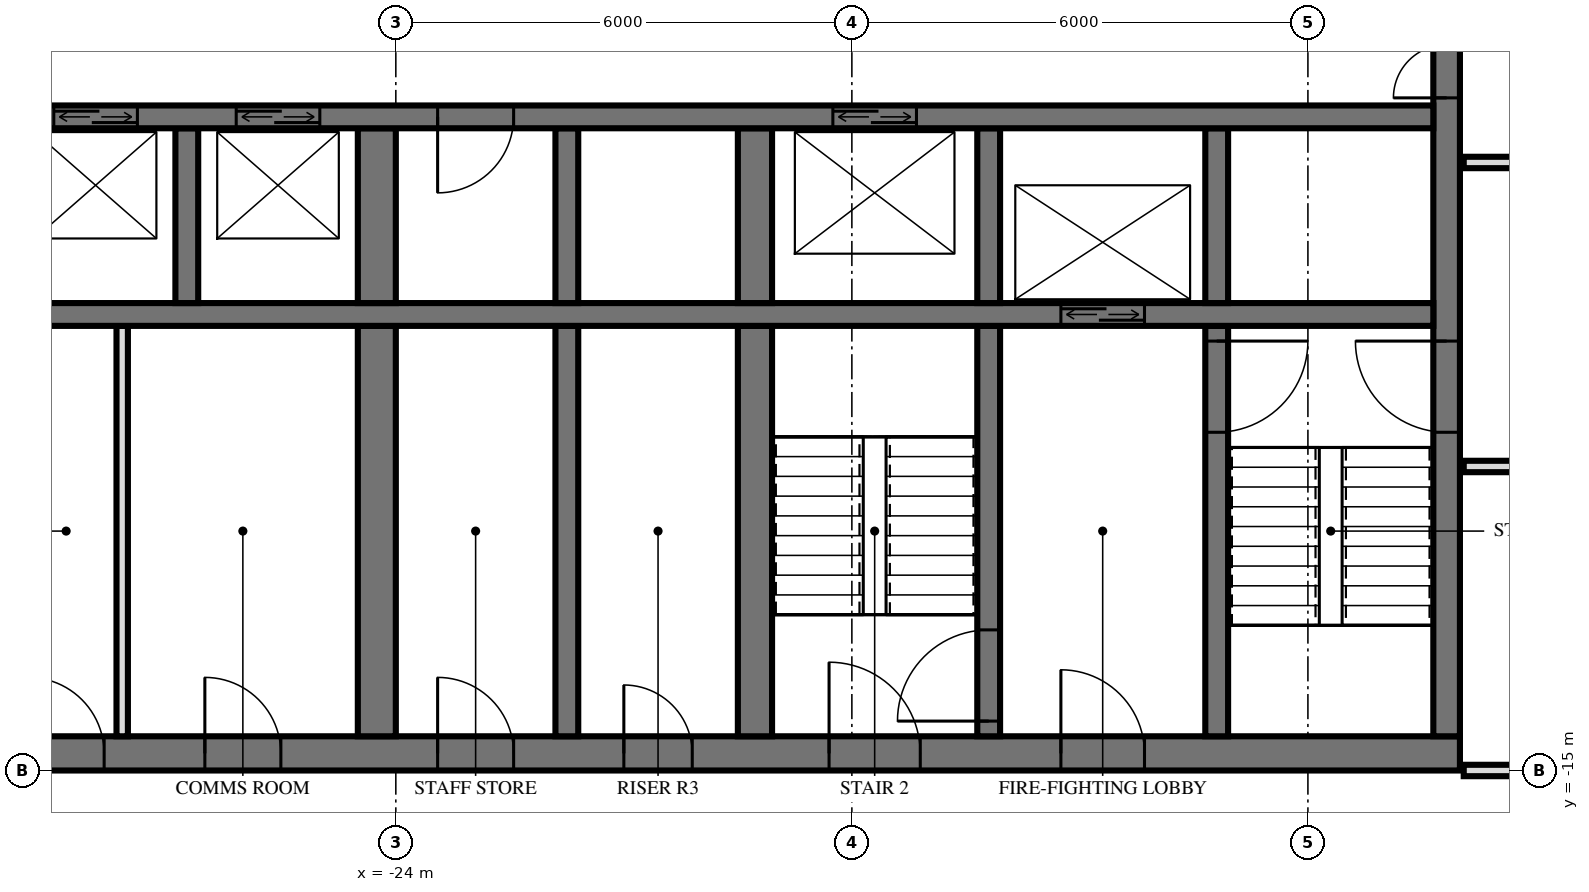
"""IFC4 building model, lengths in metres.
Left out: names, types, materials, properties, quantities, classifications, styles, units other than length and angle.
Written with IfcOpenShell. Run it as: python <this file> out.ifc"""

import sys

from ifc_helpers import new_model, si_unit, direction, frame, frame_2d, origin, place, context, subcontext, project, spatial, rectangle, extrude, element, fill, save


model = new_model("IFC4")
c1 = context("Model", 3, precision=1e-05, world=origin(), true_north=direction((0.0, 1.0)))
c2 = subcontext(c1, "Body", "Model", "MODEL_VIEW")
j1 = project(units=[si_unit("LENGTHUNIT", "METRE"), si_unit("PLANEANGLEUNIT", "RADIAN")], contexts=[c1])
p1 = place(None, origin())
s1 = spatial("IfcSite", under=j1, at=p1, CompositionType="ELEMENT")
p2 = place(p1, origin())
s2 = spatial("IfcBuilding", under=s1, at=p2, CompositionType="ELEMENT")
p3 = place(p2, frame((0.0, 0.0, 81.6)))
s3 = spatial("IfcBuildingStorey", under=s2, at=p3, CompositionType="ELEMENT", Elevation=81.6)
p4 = place(p3, frame((-29.5, -14.775, 0.0), z_axis=(0.0, 0.0, 1.0), x_axis=(1.0, 0.0, 0.0)))
e1 = element("IfcWall", 1, at=p4, inside=s3, PredefinedType="SHEAR", context=c2, shape_type="SweptSolid", body=[
    extrude(rectangle(XDim=19.5, YDim=0.45, at=frame_2d((9.75, 0.0))), origin(), (0.0, 0.0, 1.0), 3.6),
])
p5 = place(p4, frame((11.2, 0.0, 0.0)))
e2 = element("IfcOpeningElement", 2, at=p5, cuts=e1, PredefinedType="OPENING", context=c2, shape_type="SweptSolid", body=[
    extrude(rectangle(XDim=1.2, YDim=2.1, at=frame_2d((0.6, 1.05))), frame((0.0, 0.235, 0.0), z_axis=(0.0, -1.0, 0.0), x_axis=(1.0, 0.0, 0.0)), (0.0, 0.0, 1.0), 0.47),
])
p6 = place(p4, frame((14.25, 0.0, 0.0)))
e3 = element("IfcOpeningElement", 3, at=p6, cuts=e1, PredefinedType="OPENING", context=c2, shape_type="SweptSolid", body=[
    extrude(rectangle(XDim=1.1, YDim=2.1, at=frame_2d((0.55, 1.05))), frame((0.0, 0.235, 0.0), z_axis=(0.0, -1.0, 0.0), x_axis=(1.0, 0.0, 0.0)), (0.0, 0.0, 1.0), 0.47),
])
p7 = place(p4, frame((8.5, 0.0, 0.0)))
e4 = element("IfcOpeningElement", 4, at=p7, cuts=e1, PredefinedType="OPENING", context=c2, shape_type="SweptSolid", body=[
    extrude(rectangle(XDim=0.9, YDim=2.1, at=frame_2d((0.45, 1.05))), frame((0.0, 0.235, 0.0), z_axis=(0.0, -1.0, 0.0), x_axis=(1.0, 0.0, 0.0)), (0.0, 0.0, 1.0), 0.47),
])
p8 = place(p4, frame((6.05, 0.0, 0.0)))
e5 = element("IfcOpeningElement", 5, at=p8, cuts=e1, PredefinedType="OPENING", context=c2, shape_type="SweptSolid", body=[
    extrude(rectangle(XDim=1.0, YDim=2.1, at=frame_2d((0.5, 1.05))), frame((0.0, 0.235, 0.0), z_axis=(0.0, -1.0, 0.0), x_axis=(1.0, 0.0, 0.0)), (0.0, 0.0, 1.0), 0.47),
])
p9 = place(p4, frame((2.988, 0.0, 0.0)))
e6 = element("IfcOpeningElement", 6, at=p9, cuts=e1, PredefinedType="OPENING", context=c2, shape_type="SweptSolid", body=[
    extrude(rectangle(XDim=1.0, YDim=2.1, at=frame_2d((0.5, 1.05))), frame((0.0, 0.235, 0.0), z_axis=(0.0, -1.0, 0.0), x_axis=(1.0, 0.0, 0.0)), (0.0, 0.0, 1.0), 0.47),
])
p10 = place(p4, frame((0.663, 0.0, 0.0)))
e7 = element("IfcOpeningElement", 7, at=p10, cuts=e1, PredefinedType="OPENING", context=c2, shape_type="SweptSolid", body=[
    extrude(rectangle(XDim=1.0, YDim=2.1, at=frame_2d((0.5, 1.05))), frame((0.0, 0.235, 0.0), z_axis=(0.0, -1.0, 0.0), x_axis=(1.0, 0.0, 0.0)), (0.0, 0.0, 1.0), 0.47),
])
p11 = place(p3, frame((-10.175, -14.55, 0.0), z_axis=(0.0, 0.0, 1.0), x_axis=(0.0, 1.0, 0.0)))
e8 = element("IfcWall", 8, at=p11, inside=s3, PredefinedType="SHEAR", context=c2, shape_type="SweptSolid", body=[
    extrude(rectangle(XDim=14.1, YDim=0.35, at=frame_2d((7.05, 0.0))), origin(), (0.0, 0.0, 1.0), 3.6),
])
p12 = place(p11, frame((8.4, 0.0, 0.0)))
e9 = element("IfcOpeningElement", 9, at=p12, cuts=e8, PredefinedType="OPENING", context=c2, shape_type="SweptSolid", body=[
    extrude(rectangle(XDim=1.4, YDim=2.4, at=frame_2d((0.7, 1.2))), frame((0.0, 0.185, 0.0), z_axis=(0.0, -1.0, 0.0), x_axis=(1.0, 0.0, 0.0)), (0.0, 0.0, 1.0), 0.37),
])
p13 = place(p11, frame((10.0, 0.0, 0.0)))
e10 = element("IfcOpeningElement", 10, at=p13, cuts=e8, PredefinedType="OPENING", context=c2, shape_type="SweptSolid", body=[
    extrude(rectangle(XDim=1.4, YDim=2.4, at=frame_2d((0.7, 1.2))), frame((0.0, 0.185, 0.0), z_axis=(0.0, -1.0, 0.0), x_axis=(1.0, 0.0, 0.0)), (0.0, 0.0, 1.0), 0.37),
])
p14 = place(p11, frame((4.0, 0.0, 0.0)))
e11 = element("IfcOpeningElement", 11, at=p14, cuts=e8, PredefinedType="OPENING", context=c2, shape_type="SweptSolid", body=[
    extrude(rectangle(XDim=1.2, YDim=2.1, at=frame_2d((0.6, 1.05))), frame((0.0, 0.185, 0.0), z_axis=(0.0, -1.0, 0.0), x_axis=(1.0, 0.0, 0.0)), (0.0, 0.0, 1.0), 0.37),
])
p15 = place(p3, frame((-29.05, -6.4, 0.0), z_axis=(0.0, 0.0, 1.0), x_axis=(1.0, 0.0, 0.0)))
e12 = element("IfcWall", 12, at=p15, inside=s3, PredefinedType="SHEAR", context=c2, shape_type="SweptSolid", body=[
    extrude(rectangle(XDim=18.7, YDim=0.3, at=frame_2d((9.35, 0.0))), origin(), (0.0, 0.0, 1.0), 3.6),
])
p16 = place(p15, frame((2.95, 0.0, 0.0)))
e13 = element("IfcOpeningElement", 13, at=p16, cuts=e12, PredefinedType="OPENING", context=c2, shape_type="SweptSolid", body=[
    extrude(rectangle(XDim=1.1, YDim=2.1, at=frame_2d((0.55, 1.05))), frame((0.0, 0.16, 0.0), z_axis=(0.0, -1.0, 0.0), x_axis=(1.0, 0.0, 0.0)), (0.0, 0.0, 1.0), 0.32),
])
p17 = place(p15, frame((0.55, 0.0, 0.0)))
e14 = element("IfcOpeningElement", 14, at=p17, cuts=e12, PredefinedType="OPENING", context=c2, shape_type="SweptSolid", body=[
    extrude(rectangle(XDim=1.1, YDim=2.1, at=frame_2d((0.55, 1.05))), frame((0.0, 0.16, 0.0), z_axis=(0.0, -1.0, 0.0), x_axis=(1.0, 0.0, 0.0)), (0.0, 0.0, 1.0), 0.32),
])
p18 = place(p15, frame((10.8, 0.0, 0.0)))
e15 = element("IfcOpeningElement", 15, at=p18, cuts=e12, PredefinedType="OPENING", context=c2, shape_type="SweptSolid", body=[
    extrude(rectangle(XDim=1.1, YDim=2.1, at=frame_2d((0.55, 1.05))), frame((0.0, 0.16, 0.0), z_axis=(0.0, -1.0, 0.0), x_axis=(1.0, 0.0, 0.0)), (0.0, 0.0, 1.0), 0.32),
])
p19 = place(p15, frame((5.6, 0.0, 0.0)))
e16 = element("IfcOpeningElement", 16, at=p19, cuts=e12, PredefinedType="OPENING", context=c2, shape_type="SweptSolid", body=[
    extrude(rectangle(XDim=1.0, YDim=2.1, at=frame_2d((0.5, 1.05))), frame((0.0, 0.16, 0.0), z_axis=(0.0, -1.0, 0.0), x_axis=(1.0, 0.0, 0.0)), (0.0, 0.0, 1.0), 0.32),
])
p20 = place(p3, frame((-29.05, -9.0, 0.0), z_axis=(0.0, 0.0, 1.0), x_axis=(1.0, 0.0, 0.0)))
e17 = element("IfcWall", 17, at=p20, inside=s3, PredefinedType="SHEAR", context=c2, shape_type="SweptSolid", body=[
    extrude(rectangle(XDim=18.7, YDim=0.3, at=frame_2d((9.35, 0.0))), origin(), (0.0, 0.0, 1.0), 3.6),
])
p21 = place(p20, frame((13.8, 0.0, 0.0)))
e18 = element("IfcOpeningElement", 18, at=p21, cuts=e17, PredefinedType="OPENING", context=c2, shape_type="SweptSolid", body=[
    extrude(rectangle(XDim=1.1, YDim=2.1, at=frame_2d((0.55, 1.05))), frame((0.0, 0.16, 0.0), z_axis=(0.0, -1.0, 0.0), x_axis=(1.0, 0.0, 0.0)), (0.0, 0.0, 1.0), 0.32),
])
p22 = place(p3, frame((-13.2, -8.85, 0.0), z_axis=(0.0, 0.0, 1.0), x_axis=(0.0, 1.0, 0.0)))
e19 = element("IfcWall", 19, at=p22, inside=s3, PredefinedType="SHEAR", context=c2, shape_type="SweptSolid", body=[
    extrude(rectangle(XDim=2.3, YDim=0.3, at=frame_2d((1.15, 0.0))), origin(), (0.0, 0.0, 1.0), 3.6),
])
p23 = place(p3, frame((-13.2, -14.55, 0.0), z_axis=(0.0, 0.0, 1.0), x_axis=(0.0, 1.0, 0.0)))
e20 = element("IfcWall", 20, at=p23, inside=s3, PredefinedType="SHEAR", context=c2, shape_type="SweptSolid", body=[
    extrude(rectangle(XDim=5.4, YDim=0.3, at=frame_2d((2.7, 0.0))), origin(), (0.0, 0.0, 1.0), 3.6),
])
p24 = place(p23, frame((4.0, 0.0, 0.0)))
e21 = element("IfcOpeningElement", 21, at=p24, cuts=e20, PredefinedType="OPENING", context=c2, shape_type="SweptSolid", body=[
    extrude(rectangle(XDim=1.2, YDim=2.1, at=frame_2d((0.6, 1.05))), frame((0.0, 0.16, 0.0), z_axis=(0.0, -1.0, 0.0), x_axis=(1.0, 0.0, 0.0)), (0.0, 0.0, 1.0), 0.32),
])
p25 = place(p3, frame((-16.2, -8.85, 0.0), z_axis=(0.0, 0.0, 1.0), x_axis=(0.0, 1.0, 0.0)))
e22 = element("IfcWall", 22, at=p25, inside=s3, PredefinedType="SHEAR", context=c2, shape_type="SweptSolid", body=[
    extrude(rectangle(XDim=2.3, YDim=0.3, at=frame_2d((1.15, 0.0))), origin(), (0.0, 0.0, 1.0), 3.6),
])
p26 = place(p3, frame((-16.2, -14.55, 0.0), z_axis=(0.0, 0.0, 1.0), x_axis=(0.0, 1.0, 0.0)))
e23 = element("IfcWall", 23, at=p26, inside=s3, PredefinedType="SHEAR", context=c2, shape_type="SweptSolid", body=[
    extrude(rectangle(XDim=5.4, YDim=0.3, at=frame_2d((2.7, 0.0))), origin(), (0.0, 0.0, 1.0), 3.6),
])
p27 = place(p26, frame((0.2, 0.0, 0.0)))
e24 = element("IfcOpeningElement", 24, at=p27, cuts=e23, PredefinedType="OPENING", context=c2, shape_type="SweptSolid", body=[
    extrude(rectangle(XDim=1.2, YDim=2.1, at=frame_2d((0.6, 1.05))), frame((0.0, 0.16, 0.0), z_axis=(0.0, -1.0, 0.0), x_axis=(1.0, 0.0, 0.0)), (0.0, 0.0, 1.0), 0.32),
])
p28 = place(p3, frame((-19.275, -8.85, 0.0), z_axis=(0.0, 0.0, 1.0), x_axis=(0.0, 1.0, 0.0)))
e25 = element("IfcWall", 25, at=p28, inside=s3, PredefinedType="SHEAR", context=c2, shape_type="SweptSolid", body=[
    extrude(rectangle(XDim=2.3, YDim=0.45, at=frame_2d((1.15, 0.0))), origin(), (0.0, 0.0, 1.0), 3.6),
])
p29 = place(p3, frame((-19.275, -14.55, 0.0), z_axis=(0.0, 0.0, 1.0), x_axis=(0.0, 1.0, 0.0)))
e26 = element("IfcWall", 26, at=p29, inside=s3, PredefinedType="SHEAR", context=c2, shape_type="SweptSolid", body=[
    extrude(rectangle(XDim=5.4, YDim=0.45, at=frame_2d((2.7, 0.0))), origin(), (0.0, 0.0, 1.0), 3.6),
])
p30 = place(p3, frame((-21.75, -8.85, 0.0), z_axis=(0.0, 0.0, 1.0), x_axis=(0.0, 1.0, 0.0)))
e27 = element("IfcWall", 27, at=p30, inside=s3, PredefinedType="SHEAR", context=c2, shape_type="SweptSolid", body=[
    extrude(rectangle(XDim=2.3, YDim=0.3, at=frame_2d((1.15, 0.0))), origin(), (0.0, 0.0, 1.0), 3.6),
])
p31 = place(p3, frame((-21.75, -14.55, 0.0), z_axis=(0.0, 0.0, 1.0), x_axis=(0.0, 1.0, 0.0)))
e28 = element("IfcWall", 28, at=p31, inside=s3, PredefinedType="SHEAR", context=c2, shape_type="SweptSolid", body=[
    extrude(rectangle(XDim=5.4, YDim=0.3, at=frame_2d((2.7, 0.0))), origin(), (0.0, 0.0, 1.0), 3.6),
])
p32 = place(p3, frame((-24.25, -8.85, 0.0), z_axis=(0.0, 0.0, 1.0), x_axis=(0.0, 1.0, 0.0)))
e29 = element("IfcWall", 29, at=p32, inside=s3, PredefinedType="SHEAR", context=c2, shape_type="SweptSolid", body=[
    extrude(rectangle(XDim=2.3, YDim=0.5, at=frame_2d((1.15, 0.0))), origin(), (0.0, 0.0, 1.0), 3.6),
])
p33 = place(p3, frame((-24.25, -14.55, 0.0), z_axis=(0.0, 0.0, 1.0), x_axis=(0.0, 1.0, 0.0)))
e30 = element("IfcWall", 30, at=p33, inside=s3, PredefinedType="SHEAR", context=c2, shape_type="SweptSolid", body=[
    extrude(rectangle(XDim=5.4, YDim=0.5, at=frame_2d((2.7, 0.0))), origin(), (0.0, 0.0, 1.0), 3.6),
])
p34 = place(p3, frame((-26.75, -8.85, 0.0), z_axis=(0.0, 0.0, 1.0), x_axis=(0.0, 1.0, 0.0)))
e31 = element("IfcWall", 31, at=p34, inside=s3, PredefinedType="SHEAR", context=c2, shape_type="SweptSolid", body=[
    extrude(rectangle(XDim=2.3, YDim=0.3, at=frame_2d((1.15, 0.0))), origin(), (0.0, 0.0, 1.0), 3.6),
])
p35 = place(p3, frame((-27.6, -14.55, 0.0), z_axis=(0.0, 0.0, 1.0), x_axis=(0.0, 1.0, 0.0)))
e32 = element("IfcWall", 32, at=p35, inside=s3, PredefinedType="PARTITIONING", context=c2, shape_type="SweptSolid", body=[
    extrude(rectangle(XDim=5.4, YDim=0.15, at=frame_2d((2.7, 0.0))), origin(), (0.0, 0.0, 1.0), 3.3),
])
p36 = place(p3, frame((-9.95, -15.0, 0.0), z_axis=(0.0, 0.0, 1.0), x_axis=(1.0, 0.0, 0.0)))
e33 = element("IfcWall", 33, at=p36, inside=s3, PredefinedType="PARTITIONING", context=c2, shape_type="SweptSolid", body=[
    extrude(rectangle(XDim=19.9, YDim=0.15, at=frame_2d((9.95, 0.0))), origin(), (0.0, 0.0, 1.0), 2.684),
])
p37 = place(p36, frame((9.45, 0.0, 0.0)))
e34 = element("IfcOpeningElement", 34, at=p37, cuts=e33, PredefinedType="OPENING", context=c2, shape_type="SweptSolid", body=[
    extrude(rectangle(XDim=1.0, YDim=2.1, at=frame_2d((0.5, 1.05))), frame((0.0, 0.085, 0.0), z_axis=(0.0, -1.0, 0.0), x_axis=(1.0, 0.0, 0.0)), (0.0, 0.0, 1.0), 0.17),
])
p38 = place(p3, frame((-9.95, -11.0, 0.0), z_axis=(0.0, 0.0, 1.0), x_axis=(1.0, 0.0, 0.0)))
e35 = element("IfcWall", 35, at=p38, inside=s3, PredefinedType="PARTITIONING", context=c2, shape_type="SweptSolid", body=[
    extrude(rectangle(XDim=19.9, YDim=0.15, at=frame_2d((9.95, 0.0))), origin(), (0.0, 0.0, 1.0), 3.32),
])
p39 = place(p38, frame((9.45, 0.0, 0.0)))
e36 = element("IfcOpeningElement", 36, at=p39, cuts=e35, PredefinedType="OPENING", context=c2, shape_type="SweptSolid", body=[
    extrude(rectangle(XDim=1.0, YDim=2.1, at=frame_2d((0.5, 1.05))), frame((0.0, 0.085, 0.0), z_axis=(0.0, -1.0, 0.0), x_axis=(1.0, 0.0, 0.0)), (0.0, 0.0, 1.0), 0.17),
])
p40 = place(p38, frame((3.45, 0.0, 0.0)))
e37 = element("IfcOpeningElement", 37, at=p40, cuts=e35, PredefinedType="OPENING", context=c2, shape_type="SweptSolid", body=[
    extrude(rectangle(XDim=1.0, YDim=2.1, at=frame_2d((0.5, 1.05))), frame((0.0, 0.085, 0.0), z_axis=(0.0, -1.0, 0.0), x_axis=(1.0, 0.0, 0.0)), (0.0, 0.0, 1.0), 0.17),
])
p41 = place(p3, frame((-9.95, -7.0, 0.0), z_axis=(0.0, 0.0, 1.0), x_axis=(1.0, 0.0, 0.0)))
e38 = element("IfcWall", 38, at=p41, inside=s3, PredefinedType="PARTITIONING", context=c2, shape_type="SweptSolid", body=[
    extrude(rectangle(XDim=19.9, YDim=0.15, at=frame_2d((9.95, 0.0))), origin(), (0.0, 0.0, 1.0), 3.32),
])
p42 = place(p41, frame((9.45, 0.0, 0.0)))
e39 = element("IfcOpeningElement", 39, at=p42, cuts=e38, PredefinedType="OPENING", context=c2, shape_type="SweptSolid", body=[
    extrude(rectangle(XDim=1.0, YDim=2.1, at=frame_2d((0.5, 1.05))), frame((0.0, 0.085, 0.0), z_axis=(0.0, -1.0, 0.0), x_axis=(1.0, 0.0, 0.0)), (0.0, 0.0, 1.0), 0.17),
])
p43 = place(p41, frame((15.45, 0.0, 0.0)))
e40 = element("IfcOpeningElement", 40, at=p43, cuts=e38, PredefinedType="OPENING", context=c2, shape_type="SweptSolid", body=[
    extrude(rectangle(XDim=1.0, YDim=2.1, at=frame_2d((0.5, 1.05))), frame((0.0, 0.085, 0.0), z_axis=(0.0, -1.0, 0.0), x_axis=(1.0, 0.0, 0.0)), (0.0, 0.0, 1.0), 0.17),
])
p44 = place(p16, origin())
e41 = element("IfcDoor", 41, at=p44, inside=s3, OperationType="DOUBLE_DOOR_SLIDING", PredefinedType="USERDEFINED", context=c2, shape_type="SweptSolid", body=[
    extrude(rectangle(XDim=1.1, YDim=2.1, at=frame_2d((0.55, 1.05))), frame((0.0, 0.025, 0.0), z_axis=(0.0, -1.0, 0.0), x_axis=(1.0, 0.0, 0.0)), (0.0, 0.0, 1.0), 0.05),
])
fill(e13, e41)
p45 = place(p17, origin())
e42 = element("IfcDoor", 42, at=p45, inside=s3, OperationType="DOUBLE_DOOR_SLIDING", PredefinedType="USERDEFINED", context=c2, shape_type="SweptSolid", body=[
    extrude(rectangle(XDim=1.1, YDim=2.1, at=frame_2d((0.55, 1.05))), frame((0.0, 0.025, 0.0), z_axis=(0.0, -1.0, 0.0), x_axis=(1.0, 0.0, 0.0)), (0.0, 0.0, 1.0), 0.05),
])
fill(e14, e42)
p46 = place(p21, origin())
e43 = element("IfcDoor", 43, at=p46, inside=s3, OperationType="DOUBLE_DOOR_SLIDING", PredefinedType="USERDEFINED", context=c2, shape_type="SweptSolid", body=[
    extrude(rectangle(XDim=1.1, YDim=2.1, at=frame_2d((0.55, 1.05))), frame((0.0, 0.025, 0.0), z_axis=(0.0, -1.0, 0.0), x_axis=(1.0, 0.0, 0.0)), (0.0, 0.0, 1.0), 0.05),
])
fill(e18, e43)
p47 = place(p18, origin())
e44 = element("IfcDoor", 44, at=p47, inside=s3, OperationType="DOUBLE_DOOR_SLIDING", PredefinedType="USERDEFINED", context=c2, shape_type="SweptSolid", body=[
    extrude(rectangle(XDim=1.1, YDim=2.1, at=frame_2d((0.55, 1.05))), frame((0.0, 0.025, 0.0), z_axis=(0.0, -1.0, 0.0), x_axis=(1.0, 0.0, 0.0)), (0.0, 0.0, 1.0), 0.05),
])
fill(e15, e44)
p48 = place(p12, origin())
e45 = element("IfcDoor", 45, at=p48, inside=s3, OperationType="DOUBLE_DOOR_SINGLE_SWING", PredefinedType="DOOR", context=c2, shape_type="SweptSolid", body=[
    extrude(rectangle(XDim=1.4, YDim=2.4, at=frame_2d((0.7, 1.2))), frame((0.0, 0.025, 0.0), z_axis=(0.0, -1.0, 0.0), x_axis=(1.0, 0.0, 0.0)), (0.0, 0.0, 1.0), 0.05),
])
fill(e9, e45)
p49 = place(p14, origin())
e46 = element("IfcDoor", 46, at=p49, inside=s3, OperationType="SINGLE_SWING_LEFT", PredefinedType="DOOR", context=c2, shape_type="SweptSolid", body=[
    extrude(rectangle(XDim=1.2, YDim=2.1, at=frame_2d((0.6, 1.05))), frame((0.0, 0.025, 0.0), z_axis=(0.0, -1.0, 0.0), x_axis=(1.0, 0.0, 0.0)), (0.0, 0.0, 1.0), 0.05),
])
fill(e11, e46)
p50 = place(p5, origin())
e47 = element("IfcDoor", 47, at=p50, inside=s3, OperationType="SINGLE_SWING_RIGHT", PredefinedType="DOOR", context=c2, shape_type="SweptSolid", body=[
    extrude(rectangle(XDim=1.2, YDim=2.1, at=frame_2d((0.6, 1.05))), frame((0.0, 0.025, 0.0), z_axis=(0.0, -1.0, 0.0), x_axis=(1.0, 0.0, 0.0)), (0.0, 0.0, 1.0), 0.05),
])
fill(e2, e47)
p51 = place(p6, origin())
e48 = element("IfcDoor", 48, at=p51, inside=s3, OperationType="SINGLE_SWING_RIGHT", PredefinedType="DOOR", context=c2, shape_type="SweptSolid", body=[
    extrude(rectangle(XDim=1.1, YDim=2.1, at=frame_2d((0.55, 1.05))), frame((0.0, 0.025, 0.0), z_axis=(0.0, -1.0, 0.0), x_axis=(1.0, 0.0, 0.0)), (0.0, 0.0, 1.0), 0.05),
])
fill(e3, e48)
p52 = place(p7, origin())
e49 = element("IfcDoor", 49, at=p52, inside=s3, OperationType="SINGLE_SWING_RIGHT", PredefinedType="DOOR", context=c2, shape_type="SweptSolid", body=[
    extrude(rectangle(XDim=0.9, YDim=2.1, at=frame_2d((0.45, 1.05))), frame((0.0, 0.025, 0.0), z_axis=(0.0, -1.0, 0.0), x_axis=(1.0, 0.0, 0.0)), (0.0, 0.0, 1.0), 0.05),
])
fill(e4, e49)
p53 = place(p8, origin())
e50 = element("IfcDoor", 50, at=p53, inside=s3, OperationType="SINGLE_SWING_RIGHT", PredefinedType="DOOR", context=c2, shape_type="SweptSolid", body=[
    extrude(rectangle(XDim=1.0, YDim=2.1, at=frame_2d((0.5, 1.05))), frame((0.0, 0.025, 0.0), z_axis=(0.0, -1.0, 0.0), x_axis=(1.0, 0.0, 0.0)), (0.0, 0.0, 1.0), 0.05),
])
fill(e5, e50)
p54 = place(p9, origin())
e51 = element("IfcDoor", 51, at=p54, inside=s3, OperationType="SINGLE_SWING_RIGHT", PredefinedType="DOOR", context=c2, shape_type="SweptSolid", body=[
    extrude(rectangle(XDim=1.0, YDim=2.1, at=frame_2d((0.5, 1.05))), frame((0.0, 0.025, 0.0), z_axis=(0.0, -1.0, 0.0), x_axis=(1.0, 0.0, 0.0)), (0.0, 0.0, 1.0), 0.05),
])
fill(e6, e51)
p55 = place(p10, origin())
e52 = element("IfcDoor", 52, at=p55, inside=s3, OperationType="SINGLE_SWING_RIGHT", PredefinedType="DOOR", context=c2, shape_type="SweptSolid", body=[
    extrude(rectangle(XDim=1.0, YDim=2.1, at=frame_2d((0.5, 1.05))), frame((0.0, 0.025, 0.0), z_axis=(0.0, -1.0, 0.0), x_axis=(1.0, 0.0, 0.0)), (0.0, 0.0, 1.0), 0.05),
])
fill(e7, e52)
p56 = place(p19, frame((0.5, 0.0, 0.0), z_axis=(0.0, 0.0, 1.0), x_axis=(-1.0, 0.0, 0.0)))
e53 = element("IfcDoor", 53, at=p56, inside=s3, OperationType="SINGLE_SWING_LEFT", PredefinedType="DOOR", context=c2, shape_type="SweptSolid", body=[
    extrude(rectangle(XDim=1.0, YDim=2.1, at=frame_2d((0.0, 1.05))), frame((0.0, -0.025, 0.0), z_axis=(0.0, 1.0, 0.0), x_axis=(-1.0, 0.0, 0.0)), (0.0, 0.0, 1.0), 0.05),
])
fill(e16, e53)
p57 = place(p24, frame((0.6, 0.0, 0.0), z_axis=(0.0, 0.0, 1.0), x_axis=(-1.0, 0.0, 0.0)))
e54 = element("IfcDoor", 54, at=p57, inside=s3, OperationType="SINGLE_SWING_RIGHT", PredefinedType="DOOR", context=c2, shape_type="SweptSolid", body=[
    extrude(rectangle(XDim=1.2, YDim=2.1, at=frame_2d((0.0, 1.05))), frame((0.0, -0.025, 0.0), z_axis=(0.0, 1.0, 0.0), x_axis=(-1.0, 0.0, 0.0)), (0.0, 0.0, 1.0), 0.05),
])
fill(e21, e54)
p58 = place(p27, origin())
e55 = element("IfcDoor", 55, at=p58, inside=s3, OperationType="SINGLE_SWING_RIGHT", PredefinedType="DOOR", context=c2, shape_type="SweptSolid", body=[
    extrude(rectangle(XDim=1.2, YDim=2.1, at=frame_2d((0.6, 1.05))), frame((0.0, 0.025, 0.0), z_axis=(0.0, -1.0, 0.0), x_axis=(1.0, 0.0, 0.0)), (0.0, 0.0, 1.0), 0.05),
])
fill(e24, e55)
save(model, sys.argv[1])
